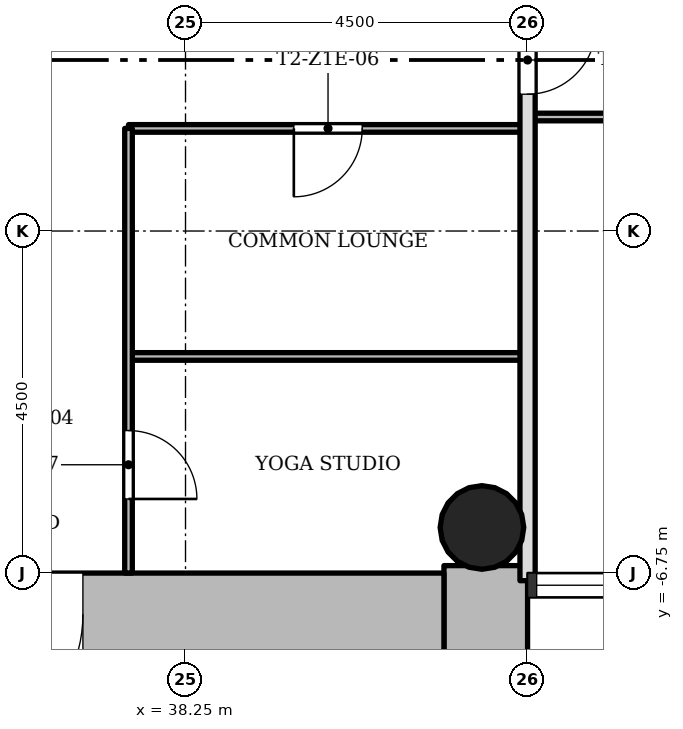
"""IFC4 building model, lengths in metres.
Left out: names, types, materials, properties, quantities, classifications, styles, units other than length and angle.
Written with IfcOpenShell. Run it as: python <this file> out.ifc"""

import sys

from ifc_helpers import new_model, si_unit, direction, frame, frame_2d, origin, origin_2d, place, context, subcontext, project, spatial, rectangle, hollow_circle, extrude, element, fill, save


model = new_model("IFC4")
c1 = context("Model", 3, precision=1e-05, world=origin(), true_north=direction((0.0, 1.0)))
c2 = subcontext(c1, "Body", "Model", "MODEL_VIEW")
j1 = project(units=[si_unit("LENGTHUNIT", "METRE"), si_unit("PLANEANGLEUNIT", "RADIAN")], contexts=[c1])
p1 = place(None, origin())
s1 = spatial("IfcSite", under=j1, at=p1, CompositionType="ELEMENT")
p2 = place(p1, origin())
s2 = spatial("IfcBuilding", under=s1, at=p2, CompositionType="ELEMENT")
p3 = place(p2, frame((0.0, 0.0, 65.3)))
s3 = spatial("IfcBuildingStorey", under=s2, at=p3, CompositionType="ELEMENT", Elevation=65.3)
p4 = place(p3, frame((42.2, -15.248, 0.0), z_axis=(0.0, 0.0, 1.0), x_axis=(0.0, 1.0, 0.0)))
e1 = element("IfcWall", 1, at=p4, inside=s3, PredefinedType="SHEAR", context=c2, shape_type="SweptSolid", body=[
    extrude(rectangle(XDim=8.596, YDim=1.1, at=frame_2d((4.298, 0.0))), origin(), (0.0, 0.0, 1.0), 3.4),
])
p5 = place(p3, frame((41.65, -7.3, 0.0), z_axis=(0.0, 0.0, 1.0), x_axis=(-1.0, 0.0, 0.0)))
e2 = element("IfcWall", 2, at=p5, inside=s3, PredefinedType="SHEAR", context=c2, shape_type="SweptSolid", body=[
    extrude(rectangle(XDim=12.4, YDim=1.1, at=frame_2d((6.2, 0.0))), origin(), (0.0, 0.0, 1.0), 3.4),
])
p6 = place(p5, frame((4.75, 0.0, 0.0)))
e3 = element("IfcOpeningElement", 3, at=p6, cuts=e2, PredefinedType="OPENING", context=c2, shape_type="SweptSolid", body=[
    extrude(rectangle(XDim=1.8, YDim=2.1, at=frame_2d((0.9, 1.05))), frame((0.0, 0.56, 0.0), z_axis=(0.0, -1.0, 0.0), x_axis=(1.0, 0.0, 0.0)), (0.0, 0.0, 1.0), 1.12),
])
p7 = place(p3, frame((42.15, -6.15, 0.0), z_axis=(0.0, 0.0, 1.0), x_axis=(1.0, 0.0, 0.0)))
e4 = element("IfcColumn", 4, at=p7, inside=s3, PredefinedType="COLUMN", context=c2, shape_type="SweptSolid", body=[
    extrude(hollow_circle(Radius=0.55, WallThickness=0.04, at=origin_2d()), origin(), (0.0, 0.0, 1.0), 3.4),
])
p8 = place(p3, frame((42.75, -3.9, 0.0), z_axis=(0.0, 0.0, 1.0), x_axis=(-1.0, 0.0, 0.0)))
e5 = element("IfcWall", 5, at=p8, inside=s3, PredefinedType="PARTITIONING", context=c2, shape_type="SweptSolid", body=[
    extrude(rectangle(XDim=5.25, YDim=0.1, at=frame_2d((2.625, 0.0))), origin(), (0.0, 0.0, 1.0), 3.0),
])
p9 = place(p3, frame((42.75, -0.9, 0.0), z_axis=(0.0, 0.0, 1.0), x_axis=(-1.0, 0.0, 0.0)))
e6 = element("IfcWall", 6, at=p9, inside=s3, PredefinedType="PARTITIONING", context=c2, shape_type="SweptSolid", body=[
    extrude(rectangle(XDim=5.25, YDim=0.1, at=frame_2d((2.625, 0.0))), origin(), (0.0, 0.0, 1.0), 3.0),
])
p10 = place(p9, frame((2.175, 0.0, 0.0)))
e7 = element("IfcOpeningElement", 7, at=p10, cuts=e6, PredefinedType="OPENING", context=c2, shape_type="SweptSolid", body=[
    extrude(rectangle(XDim=0.9, YDim=2.1, at=frame_2d((0.45, 1.05))), frame((0.0, 0.06, 0.0), z_axis=(0.0, -1.0, 0.0), x_axis=(1.0, 0.0, 0.0)), (0.0, 0.0, 1.0), 0.12),
])
p11 = place(p3, frame((47.25, -0.75, 0.0), z_axis=(0.0, 0.0, 1.0), x_axis=(-1.0, 0.0, 0.0)))
e8 = element("IfcWall", 8, at=p11, inside=s3, PredefinedType="PARTITIONING", context=c2, shape_type="SweptSolid", body=[
    extrude(rectangle(XDim=4.5, YDim=0.1, at=frame_2d((2.25, 0.0))), origin(), (0.0, 0.0, 1.0), 3.0),
])
p12 = place(p11, frame((1.8, 0.0, 0.0)))
e9 = element("IfcOpeningElement", 9, at=p12, cuts=e8, PredefinedType="OPENING", context=c2, shape_type="SweptSolid", body=[
    extrude(rectangle(XDim=0.9, YDim=2.1, at=frame_2d((0.45, 1.05))), frame((0.0, 0.06, 0.0), z_axis=(0.0, -1.0, 0.0), x_axis=(1.0, 0.0, 0.0)), (0.0, 0.0, 1.0), 0.12),
])
p13 = place(p3, frame((42.75, -6.85, 0.0), z_axis=(0.0, 0.0, 1.0), x_axis=(0.0, 1.0, 0.0)))
e10 = element("IfcWall", 10, at=p13, inside=s3, PredefinedType="SOLIDWALL", context=c2, shape_type="SweptSolid", body=[
    extrude(rectangle(XDim=13.7, YDim=0.2, at=frame_2d((6.85, 0.0))), origin(), (0.0, 0.0, 1.0), 3.0),
])
p14 = place(p13, frame((6.4, 0.0, 0.0)))
e11 = element("IfcOpeningElement", 11, at=p14, cuts=e10, PredefinedType="OPENING", context=c2, shape_type="SweptSolid", body=[
    extrude(rectangle(XDim=0.9, YDim=2.1, at=frame_2d((0.45, 1.05))), frame((0.0, 0.11, 0.0), z_axis=(0.0, -1.0, 0.0), x_axis=(1.0, 0.0, 0.0)), (0.0, 0.0, 1.0), 0.22),
])
p15 = place(p3, frame((37.5, -6.75, 0.0), z_axis=(0.0, 0.0, 1.0), x_axis=(0.0, 1.0, 0.0)))
e12 = element("IfcWall", 12, at=p15, inside=s3, PredefinedType="PARTITIONING", context=c2, shape_type="SweptSolid", body=[
    extrude(rectangle(XDim=5.85, YDim=0.1, at=frame_2d((2.925, 0.0))), origin(), (0.0, 0.0, 1.0), 3.0),
])
p16 = place(p15, frame((0.975, 0.0, 0.0)))
e13 = element("IfcOpeningElement", 13, at=p16, cuts=e12, PredefinedType="OPENING", context=c2, shape_type="SweptSolid", body=[
    extrude(rectangle(XDim=0.9, YDim=2.1, at=frame_2d((0.45, 1.05))), frame((0.0, 0.06, 0.0), z_axis=(0.0, -1.0, 0.0), x_axis=(1.0, 0.0, 0.0)), (0.0, 0.0, 1.0), 0.12),
])
p17 = place(p10, origin())
e14 = element("IfcDoor", 14, at=p17, inside=s3, OperationType="SINGLE_SWING_LEFT", PredefinedType="DOOR", context=c2, shape_type="SweptSolid", body=[
    extrude(rectangle(XDim=0.9, YDim=2.1, at=frame_2d((0.45, 1.05))), frame((0.0, 0.025, 0.0), z_axis=(0.0, -1.0, 0.0), x_axis=(1.0, 0.0, 0.0)), (0.0, 0.0, 1.0), 0.05),
])
fill(e7, e14)
p18 = place(p16, origin())
e15 = element("IfcDoor", 15, at=p18, inside=s3, OperationType="SINGLE_SWING_LEFT", PredefinedType="DOOR", context=c2, shape_type="SweptSolid", body=[
    extrude(rectangle(XDim=0.9, YDim=2.1, at=frame_2d((0.45, 1.05))), frame((0.0, 0.025, 0.0), z_axis=(0.0, -1.0, 0.0), x_axis=(1.0, 0.0, 0.0)), (0.0, 0.0, 1.0), 0.05),
])
fill(e13, e15)
p19 = place(p14, origin())
e16 = element("IfcDoor", 16, at=p19, inside=s3, OperationType="SINGLE_SWING_RIGHT", PredefinedType="DOOR", context=c2, shape_type="SweptSolid", body=[
    extrude(rectangle(XDim=0.9, YDim=2.1, at=frame_2d((0.45, 1.05))), frame((0.0, 0.025, 0.0), z_axis=(0.0, -1.0, 0.0), x_axis=(1.0, 0.0, 0.0)), (0.0, 0.0, 1.0), 0.05),
])
fill(e11, e16)
p20 = place(p6, origin())
e17 = element("IfcDoor", 17, at=p20, inside=s3, OperationType="SINGLE_SWING_LEFT", PredefinedType="DOOR", context=c2, shape_type="SweptSolid", body=[
    extrude(rectangle(XDim=1.8, YDim=2.1, at=frame_2d((0.9, 1.05))), frame((0.0, 0.025, 0.0), z_axis=(0.0, -1.0, 0.0), x_axis=(1.0, 0.0, 0.0)), (0.0, 0.0, 1.0), 0.05),
])
fill(e3, e17)
save(model, sys.argv[1])
